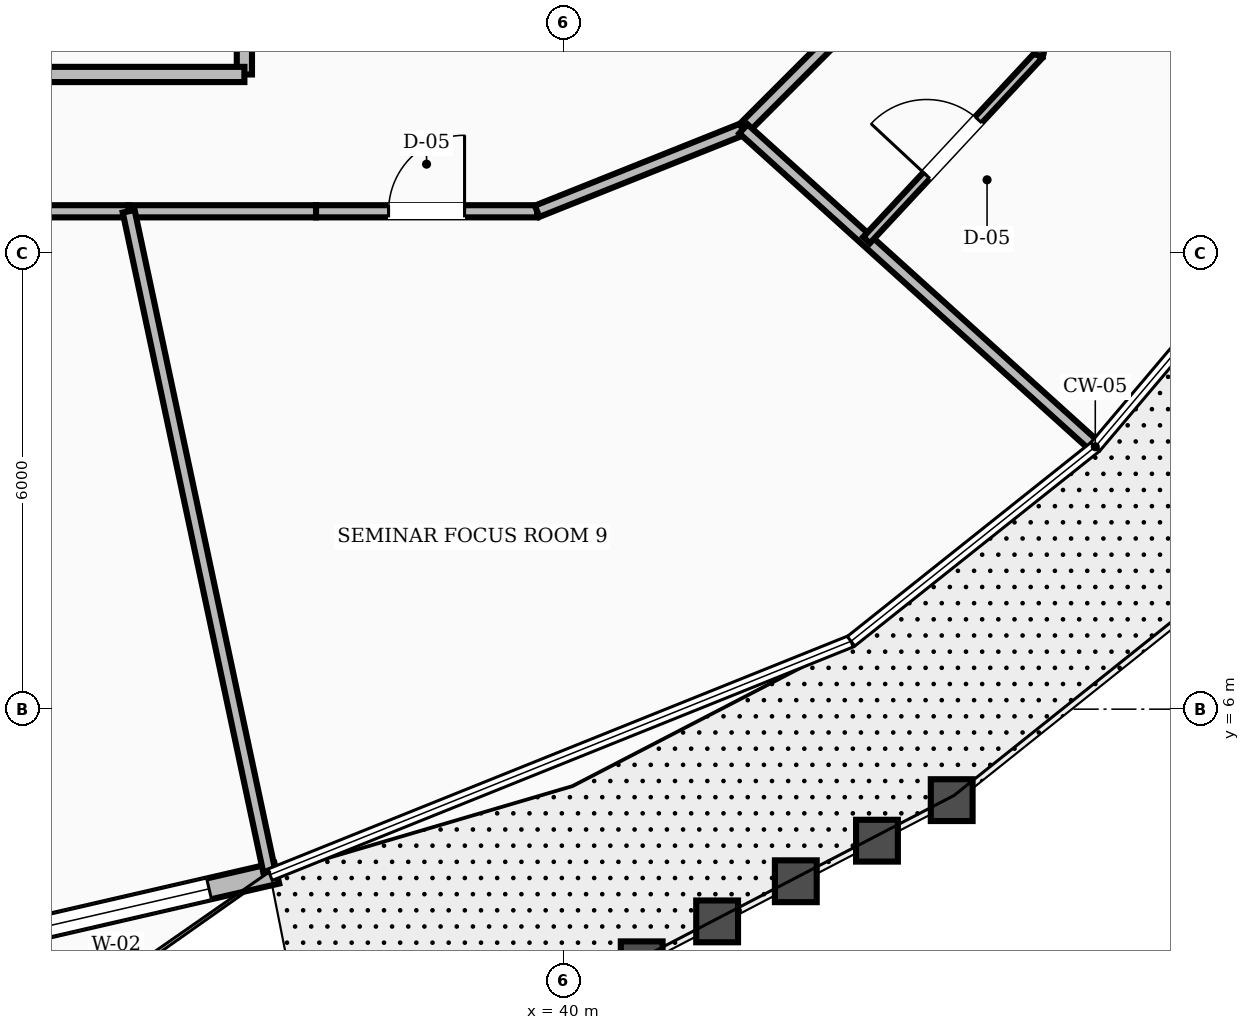
"""IFC4 building model, lengths in metres.
Left out: names, types, materials, properties, quantities, classifications, styles, units other than length and angle.
Written with IfcOpenShell. Run it as: python <this file> out.ifc"""

import sys

from ifc_helpers import new_model, si_unit, direction, frame, frame_2d, origin, place, context, subcontext, project, spatial, rectangle, extrude, element, fill, save


model = new_model("IFC4")
c1 = context("Model", 3, precision=1e-05, world=origin(), true_north=direction((0.0, 1.0)))
c2 = subcontext(c1, "Body", "Model", "MODEL_VIEW")
j1 = project(units=[si_unit("LENGTHUNIT", "METRE"), si_unit("PLANEANGLEUNIT", "RADIAN")], contexts=[c1])
p1 = place(None, origin())
s1 = spatial("IfcSite", under=j1, at=p1, CompositionType="ELEMENT")
p2 = place(p1, origin())
s2 = spatial("IfcBuilding", under=s1, at=p2, CompositionType="ELEMENT")
p3 = place(p2, frame((0.0, 0.0, 240.0)))
s3 = spatial("IfcBuildingStorey", under=s2, at=p3, CompositionType="ELEMENT", Elevation=240.0)
p4 = place(p3, frame((32.0, 2.866, 0.0), z_axis=(0.0, 0.0, 1.0), x_axis=(0.974367475621, 0.22496226895, 0.0)))
e1 = element("IfcWall", 1, at=p4, inside=s3, PredefinedType="STANDARD", context=c2, shape_type="SweptSolid", body=[
    extrude(rectangle(XDim=4.338, YDim=0.28, at=frame_2d((2.169, 0.0))), origin(), (0.0, 0.0, 1.0), 2.88),
])
p5 = place(p4, frame((0.823, 0.0, 0.8)))
e2 = element("IfcOpeningElement", 2, at=p5, cuts=e1, PredefinedType="OPENING", context=c2, shape_type="SweptSolid", body=[
    extrude(rectangle(XDim=2.6, YDim=1.65, at=frame_2d((1.3, 0.825))), frame((0.0, 0.15, 0.0), z_axis=(0.0, -1.0, 0.0), x_axis=(1.0, 0.0, 0.0)), (0.0, 0.0, 1.0), 0.3),
])
p6 = place(p3, frame((35.8, 14.35, 0.0), z_axis=(0.0, 0.0, 1.0), x_axis=(0.0, 1.0, 0.0)))
e3 = element("IfcWall", 3, at=p6, inside=s3, PredefinedType="SOLIDWALL", context=c2, shape_type="SweptSolid", body=[
    extrude(rectangle(XDim=2.2, YDim=0.2, at=frame_2d((1.1, 0.0))), origin(), (0.0, 0.0, 1.0), 2.87),
])
p7 = place(p3, frame((28.2, 14.35, 0.0), z_axis=(0.0, 0.0, 1.0), x_axis=(1.0, 0.0, 0.0)))
e4 = element("IfcWall", 4, at=p7, inside=s3, PredefinedType="SOLIDWALL", context=c2, shape_type="SweptSolid", body=[
    extrude(rectangle(XDim=7.6, YDim=0.2, at=frame_2d((3.8, 0.0))), origin(), (0.0, 0.0, 1.0), 2.87),
])
p8 = place(p7, frame((3.2, 0.0, 0.0)))
e5 = element("IfcOpeningElement", 5, at=p8, cuts=e4, PredefinedType="OPENING", context=c2, shape_type="SweptSolid", body=[
    extrude(rectangle(XDim=1.2, YDim=2.1, at=frame_2d((0.6, 1.05))), frame((0.0, 0.11, 0.0), z_axis=(0.0, -1.0, 0.0), x_axis=(1.0, 0.0, 0.0)), (0.0, 0.0, 1.0), 0.22),
])
p9 = place(p3, frame((32.0, 12.55, 0.0), z_axis=(0.0, 0.0, 1.0), x_axis=(1.0, 0.0, 0.0)))
e6 = element("IfcWall", 6, at=p9, inside=s3, PredefinedType="SOLIDWALL", context=c2, shape_type="SweptSolid", body=[
    extrude(rectangle(XDim=2.278, YDim=0.16, at=frame_2d((1.139, 0.0))), origin(), (0.0, 0.0, 1.0), 2.87),
])
p10 = place(p3, frame((34.278, 12.55, 0.0), z_axis=(0.0, 0.0, 1.0), x_axis=(1.0, 0.0, 0.0)))
e7 = element("IfcWall", 7, at=p10, inside=s3, PredefinedType="SOLIDWALL", context=c2, shape_type="SweptSolid", body=[
    extrude(rectangle(XDim=2.465, YDim=0.16, at=frame_2d((1.232, 0.0))), origin(), (0.0, 0.0, 1.0), 2.87),
])
p11 = place(p3, frame((36.743, 12.55, 0.0), z_axis=(0.0, 0.0, 1.0), x_axis=(1.0, 0.0, 0.0)))
e8 = element("IfcWall", 8, at=p11, inside=s3, PredefinedType="SOLIDWALL", context=c2, shape_type="SweptSolid", body=[
    extrude(rectangle(XDim=2.908, YDim=0.16, at=frame_2d((1.454, 0.0))), origin(), (0.0, 0.0, 1.0), 2.87),
])
p12 = place(p11, frame((0.954, 0.0, 0.0)))
e9 = element("IfcOpeningElement", 9, at=p12, cuts=e8, PredefinedType="OPENING", context=c2, shape_type="SweptSolid", body=[
    extrude(rectangle(XDim=1.0, YDim=2.1, at=frame_2d((0.5, 1.05))), frame((0.0, 0.09, 0.0), z_axis=(0.0, -1.0, 0.0), x_axis=(1.0, 0.0, 0.0)), (0.0, 0.0, 1.0), 0.18),
])
p13 = place(p3, frame((39.651, 12.55, 0.0), z_axis=(0.0, 0.0, 1.0), x_axis=(0.92856882165, 0.371160266542, 0.0)))
e10 = element("IfcWall", 10, at=p13, inside=s3, PredefinedType="SOLIDWALL", context=c2, shape_type="SweptSolid", body=[
    extrude(rectangle(XDim=2.923, YDim=0.16, at=frame_2d((1.461, 0.0))), origin(), (0.0, 0.0, 1.0), 2.87),
])
p14 = place(p3, frame((42.365, 13.635, 0.0), z_axis=(0.0, 0.0, 1.0), x_axis=(0.707106781187, 0.707106781187, 0.0)))
e11 = element("IfcWall", 11, at=p14, inside=s3, PredefinedType="SOLIDWALL", context=c2, shape_type="SweptSolid", body=[
    extrude(rectangle(XDim=2.916, YDim=0.16, at=frame_2d((1.458, 0.0))), origin(), (0.0, 0.0, 1.0), 2.87),
])
p15 = place(p3, frame((42.365, 13.635, 0.0), z_axis=(0.0, 0.0, 1.0), x_axis=(0.741996301963, -0.670403973641, 0.0)))
e12 = element("IfcWall", 12, at=p15, inside=s3, PredefinedType="SOLIDWALL", context=c2, shape_type="SweptSolid", body=[
    extrude(rectangle(XDim=6.189, YDim=0.16, at=frame_2d((3.095, 0.0))), origin(), (0.0, 0.0, 1.0), 2.87),
])
p16 = place(p3, frame((43.985, 12.171, 0.0), z_axis=(0.0, 0.0, 1.0), x_axis=(0.681293610757, 0.732010256719, 0.0)))
e13 = element("IfcWall", 13, at=p16, inside=s3, PredefinedType="PARTITIONING", context=c2, shape_type="SweptSolid", body=[
    extrude(rectangle(XDim=3.322, YDim=0.12, at=frame_2d((1.661, 0.0))), origin(), (0.0, 0.0, 1.0), 2.87),
])
p17 = place(p16, frame((1.161, 0.0, 0.0)))
e14 = element("IfcOpeningElement", 14, at=p17, cuts=e13, PredefinedType="OPENING", context=c2, shape_type="SweptSolid", body=[
    extrude(rectangle(XDim=1.0, YDim=2.1, at=frame_2d((0.5, 1.05))), frame((0.0, 0.07, 0.0), z_axis=(0.0, -1.0, 0.0), x_axis=(1.0, 0.0, 0.0)), (0.0, 0.0, 1.0), 0.14),
])
p18 = place(p3, frame((46.248, 14.602, 0.0), z_axis=(0.0, 0.0, 1.0), x_axis=(0.214483373709, 0.976727639827, 0.0)))
e15 = element("IfcWall", 15, at=p18, inside=s3, PredefinedType="PARTITIONING", context=c2, shape_type="SweptSolid", body=[
    extrude(rectangle(XDim=3.36, YDim=0.12, at=frame_2d((1.68, 0.0))), origin(), (0.0, 0.0, 1.0), 2.87),
])
p19 = place(p3, frame((34.278, 12.55, 0.0), z_axis=(0.0, 0.0, 1.0), x_axis=(0.208364107571, -0.97805132722, 0.0)))
e16 = element("IfcWall", 16, at=p19, inside=s3, PredefinedType="SOLIDWALL", context=c2, shape_type="SweptSolid", body=[
    extrude(rectangle(XDim=8.875, YDim=0.16, at=frame_2d((4.437, 0.0))), origin(), (0.0, 0.0, 1.0), 2.87),
])
p20 = place(p5, origin())
e17 = element("IfcWindow", 17, at=p20, inside=s3, PartitioningType="SINGLE_PANEL", PredefinedType="WINDOW", context=c2, shape_type="SweptSolid", body=[
    extrude(rectangle(XDim=2.6, YDim=1.65, at=frame_2d((1.3, 0.825))), frame((0.0, 0.03, 0.0), z_axis=(0.0, -1.0, 0.0), x_axis=(1.0, 0.0, 0.0)), (0.0, 0.0, 1.0), 0.06),
])
fill(e2, e17)
p21 = place(p17, origin())
e18 = element("IfcDoor", 18, at=p21, inside=s3, OperationType="SINGLE_SWING_LEFT", PredefinedType="DOOR", context=c2, shape_type="SweptSolid", body=[
    extrude(rectangle(XDim=1.0, YDim=2.1, at=frame_2d((0.5, 1.05))), frame((0.0, 0.025, 0.0), z_axis=(0.0, -1.0, 0.0), x_axis=(1.0, 0.0, 0.0)), (0.0, 0.0, 1.0), 0.05),
])
fill(e14, e18)
p22 = place(p12, origin())
e19 = element("IfcDoor", 19, at=p22, inside=s3, OperationType="SINGLE_SWING_RIGHT", PredefinedType="DOOR", context=c2, shape_type="SweptSolid", body=[
    extrude(rectangle(XDim=1.0, YDim=2.1, at=frame_2d((0.5, 1.05))), frame((0.0, 0.025, 0.0), z_axis=(0.0, -1.0, 0.0), x_axis=(1.0, 0.0, 0.0)), (0.0, 0.0, 1.0), 0.05),
])
fill(e9, e19)
save(model, sys.argv[1])
